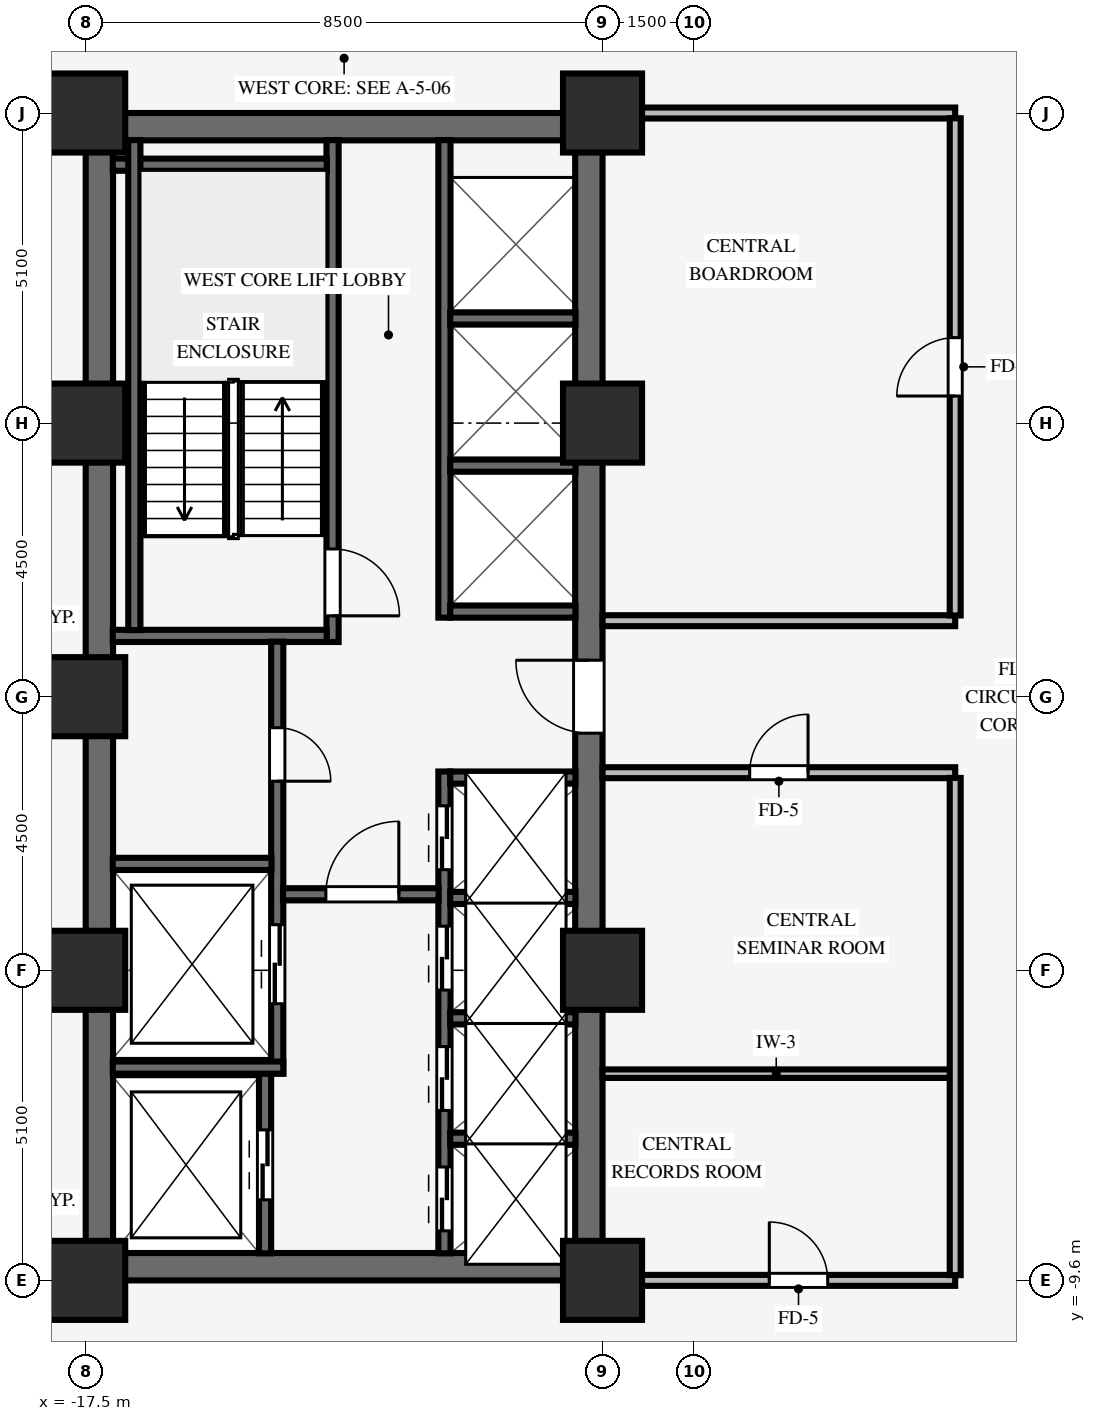
"""IFC4 building model, lengths in metres.
Left out: names, types, materials, properties, quantities, classifications, styles, units other than length and angle.
Written with IfcOpenShell. Run it as: python <this file> out.ifc"""

import sys

from ifc_helpers import new_model, si_unit, direction, frame, frame_2d, origin, origin_2d, place, context, subcontext, project, spatial, rectangle, extrude, source, transform, mapped, element, fill, save


model = new_model("IFC4")
c1 = context("Model", 3, precision=1e-05, world=origin(), true_north=direction((0.0, 1.0)))
c2 = subcontext(c1, "Body", "Model", "MODEL_VIEW")
j1 = project(units=[si_unit("LENGTHUNIT", "METRE"), si_unit("PLANEANGLEUNIT", "RADIAN")], contexts=[c1])
p1 = place(None, origin())
s1 = spatial("IfcSite", under=j1, at=p1, CompositionType="ELEMENT")
p2 = place(p1, origin())
s2 = spatial("IfcBuilding", under=s1, at=p2, CompositionType="ELEMENT")
p3 = place(p2, frame((0.0, 0.0, 27.6)))
s3 = spatial("IfcBuildingStorey", under=s2, at=p3, CompositionType="ELEMENT", Elevation=27.6)
for number, where, z_axis, x_axis in (
    (1, (-17.5, -9.375, 0.0), (0.0, 0.0, 1.0), (1.0, 0.0, 0.0)),
    (2, (-17.5, 9.375, 0.0), (0.0, 0.0, 1.0), (1.0, 0.0, 0.0)),
):
    element("IfcWall", number, at=place(p3, frame(where, z_axis=z_axis, x_axis=x_axis)), inside=s3, PredefinedType="SHEAR", context=c2, shape_type="SweptSolid", body=[
        extrude(rectangle(XDim=8.5, YDim=0.45, at=frame_2d((4.25, 0.0))), origin(), (0.0, 0.0, 1.0), 3.37),
    ])
p4 = place(p3, frame((-17.275, -9.155, 0.0), z_axis=(0.0, 0.0, 1.0), x_axis=(0.0, 1.0, 0.0)))
e3 = element("IfcWall", 3, at=p4, inside=s3, PredefinedType="SHEAR", context=c2, shape_type="SweptSolid", body=[
    extrude(rectangle(XDim=18.31, YDim=0.45, at=frame_2d((9.155, 0.0))), origin(), (0.0, 0.0, 1.0), 3.37),
])
p5 = place(p3, frame((-9.225, -9.155, 0.0), z_axis=(0.0, 0.0, 1.0), x_axis=(0.0, 1.0, 0.0)))
e4 = element("IfcWall", 4, at=p5, inside=s3, PredefinedType="SHEAR", context=c2, shape_type="SweptSolid", body=[
    extrude(rectangle(XDim=18.31, YDim=0.45, at=frame_2d((9.155, 0.0))), origin(), (0.0, 0.0, 1.0), 3.37),
])
p6 = place(p5, frame((8.555, 0.0, 0.0)))
e5 = element("IfcOpeningElement", 5, at=p6, cuts=e4, PredefinedType="OPENING", context=c2, shape_type="SweptSolid", body=[
    extrude(rectangle(XDim=1.2, YDim=2.15, at=frame_2d((0.6, 1.075))), frame((0.0, 0.235, 0.0), z_axis=(0.0, -1.0, 0.0), x_axis=(1.0, 0.0, 0.0)), (0.0, 0.0, 1.0), 0.47),
])
for number, where, z_axis, x_axis in (
    (6, (-17.5, -9.6, 0.0), (0.0, 0.0, 1.0), (1.0, 0.0, 0.0)),
    (7, (-17.5, -4.5, 0.0), (0.0, 0.0, 1.0), (1.0, 0.0, 0.0)),
    (8, (-17.5, 4.5, 0.0), (0.0, 0.0, 1.0), (1.0, 0.0, 0.0)),
    (9, (-17.5, 9.6, 0.0), (0.0, 0.0, 1.0), (1.0, 0.0, 0.0)),
    (10, (-9.0, -9.6, 0.0), (0.0, 0.0, 1.0), (1.0, 0.0, 0.0)),
    (11, (-9.0, -4.5, 0.0), (0.0, 0.0, 1.0), (1.0, 0.0, 0.0)),
    (12, (-9.0, 4.5, 0.0), (0.0, 0.0, 1.0), (1.0, 0.0, 0.0)),
    (13, (-9.0, 9.6, 0.0), (0.0, 0.0, 1.0), (1.0, 0.0, 0.0)),
    (14, (-17.5, 0.0, 0.0), (0.0, 0.0, 1.0), (1.0, 0.0, 0.0)),
):
    element("IfcColumn", number, at=place(p3, frame(where, z_axis=z_axis, x_axis=x_axis)), inside=s3, PredefinedType="COLUMN", context=c2, shape_type="SweptSolid", body=[
        extrude(rectangle(XDim=1.3, YDim=1.3, at=origin_2d()), origin(), (0.0, 0.0, 1.0), 3.37),
    ])
p7 = place(p3, frame((-13.44, 0.9, 0.0), z_axis=(0.0, 0.0, 1.0), x_axis=(0.0, 1.0, 0.0)))
e15 = element("IfcWall", 15, at=p7, inside=s3, PredefinedType="SHEAR", context=c2, shape_type="SweptSolid", body=[
    extrude(rectangle(XDim=8.255, YDim=0.2, at=frame_2d((4.127, 0.0))), origin(), (0.0, 0.0, 1.0), 3.37),
])
p8 = place(p7, frame((1.53, 0.0, 0.0), z_axis=(0.0, 0.0, 1.0), x_axis=(-1.0, 0.0, 0.0)))
e16 = element("IfcOpeningElement", 16, at=p8, cuts=e15, PredefinedType="OPENING", context=c2, shape_type="SweptSolid", body=[
    extrude(rectangle(XDim=1.1, YDim=2.15, at=frame_2d((0.55, 1.075))), frame((0.0, 0.11, 0.0), z_axis=(0.0, -1.0, 0.0), x_axis=(1.0, 0.0, 0.0)), (0.0, 0.0, 1.0), 0.22),
])
for number, where, z_axis, x_axis in (
    (17, (-17.055, 1.0, 0.0), (0.0, 0.0, 1.0), (1.0, 0.0, 0.0)),
    (18, (-17.055, 8.75, 0.0), (0.0, 0.0, 1.0), (1.0, 0.0, 0.0)),
):
    element("IfcWall", number, at=place(p3, frame(where, z_axis=z_axis, x_axis=x_axis)), inside=s3, PredefinedType="SHEAR", context=c2, shape_type="SweptSolid", body=[
        extrude(rectangle(XDim=3.52, YDim=0.2, at=frame_2d((1.76, 0.0))), origin(), (0.0, 0.0, 1.0), 3.37),
    ])
p9 = place(p3, frame((-16.7, 1.095, 0.0), z_axis=(0.0, 0.0, 1.0), x_axis=(0.0, 1.0, 0.0)))
e19 = element("IfcWall", 19, at=p9, inside=s3, PredefinedType="SHEAR", context=c2, shape_type="SweptSolid", body=[
    extrude(rectangle(XDim=8.06, YDim=0.2, at=frame_2d((4.03, 0.0))), origin(), (0.0, 0.0, 1.0), 3.37),
])
p10 = place(p3, frame((-14.55, -9.155, 0.0), z_axis=(0.0, 0.0, 1.0), x_axis=(0.0, 1.0, 0.0)))
e20 = element("IfcWall", 20, at=p10, inside=s3, PredefinedType="SHEAR", context=c2, shape_type="SweptSolid", body=[
    extrude(rectangle(XDim=2.96, YDim=0.2, at=frame_2d((1.48, 0.0))), origin(), (0.0, 0.0, 1.0), 3.37),
])
p11 = place(p10, frame((0.88, 0.0, 0.0)))
e21 = element("IfcOpeningElement", 21, at=p11, cuts=e20, PredefinedType="OPENING", context=c2, shape_type="SweptSolid", body=[
    extrude(rectangle(XDim=1.15, YDim=2.15, at=frame_2d((0.575, 1.075))), frame((0.0, 0.11, 0.0), z_axis=(0.0, -1.0, 0.0), x_axis=(1.0, 0.0, 0.0)), (0.0, 0.0, 1.0), 0.22),
])
p12 = place(p3, frame((-14.35, -6.2, 0.0), z_axis=(0.0, 0.0, 1.0), x_axis=(0.0, 1.0, 0.0)))
e22 = element("IfcWall", 22, at=p12, inside=s3, PredefinedType="SHEAR", context=c2, shape_type="SweptSolid", body=[
    extrude(rectangle(XDim=7.105, YDim=0.2, at=frame_2d((3.552, 0.0))), origin(), (0.0, 0.0, 1.0), 3.37),
])
p13 = place(p12, frame((5.69, 0.0, 0.0), z_axis=(0.0, 0.0, 1.0), x_axis=(-1.0, 0.0, 0.0)))
e23 = element("IfcOpeningElement", 23, at=p13, cuts=e22, PredefinedType="OPENING", context=c2, shape_type="SweptSolid", body=[
    extrude(rectangle(XDim=0.88, YDim=2.1, at=frame_2d((0.44, 1.05))), frame((0.0, 0.11, 0.0), z_axis=(0.0, -1.0, 0.0), x_axis=(1.0, 0.0, 0.0)), (0.0, 0.0, 1.0), 0.22),
])
p14 = place(p12, frame((1.15, 0.0, 0.0)))
e24 = element("IfcOpeningElement", 24, at=p14, cuts=e22, PredefinedType="OPENING", context=c2, shape_type="SweptSolid", body=[
    extrude(rectangle(XDim=1.3, YDim=2.2, at=frame_2d((0.65, 1.1))), frame((0.0, 0.11, 0.0), z_axis=(0.0, -1.0, 0.0), x_axis=(1.0, 0.0, 0.0)), (0.0, 0.0, 1.0), 0.22),
])
p15 = place(p3, frame((-17.055, -6.1, 0.0), z_axis=(0.0, 0.0, 1.0), x_axis=(1.0, 0.0, 0.0)))
e25 = element("IfcWall", 25, at=p15, inside=s3, PredefinedType="SHEAR", context=c2, shape_type="SweptSolid", body=[
    extrude(rectangle(XDim=2.805, YDim=0.2, at=frame_2d((1.402, 0.0))), origin(), (0.0, 0.0, 1.0), 3.37),
])
p16 = place(p3, frame((-17.055, -2.75, 0.0), z_axis=(0.0, 0.0, 1.0), x_axis=(1.0, 0.0, 0.0)))
e26 = element("IfcWall", 26, at=p16, inside=s3, PredefinedType="SHEAR", context=c2, shape_type="SweptSolid", body=[
    extrude(rectangle(XDim=2.61, YDim=0.2, at=frame_2d((1.305, 0.0))), origin(), (0.0, 0.0, 1.0), 3.37),
])
p17 = place(p3, frame((-11.6, -9.155, 0.0), z_axis=(0.0, 0.0, 1.0), x_axis=(0.0, 1.0, 0.0)))
e27 = element("IfcWall", 27, at=p17, inside=s3, PredefinedType="SHEAR", context=c2, shape_type="SweptSolid", body=[
    extrude(rectangle(XDim=7.925, YDim=0.2, at=frame_2d((3.962, 0.0))), origin(), (0.0, 0.0, 1.0), 3.37),
])
p18 = place(p17, frame((0.37, 0.0, 0.0)))
e28 = element("IfcOpeningElement", 28, at=p18, cuts=e27, PredefinedType="OPENING", context=c2, shape_type="SweptSolid", body=[
    extrude(rectangle(XDim=1.05, YDim=2.15, at=frame_2d((0.525, 1.075))), frame((0.0, 0.11, 0.0), z_axis=(0.0, -1.0, 0.0), x_axis=(1.0, 0.0, 0.0)), (0.0, 0.0, 1.0), 0.22),
])
p19 = place(p17, frame((2.35, 0.0, 0.0)))
e29 = element("IfcOpeningElement", 29, at=p19, cuts=e27, PredefinedType="OPENING", context=c2, shape_type="SweptSolid", body=[
    extrude(rectangle(XDim=1.05, YDim=2.15, at=frame_2d((0.525, 1.075))), frame((0.0, 0.11, 0.0), z_axis=(0.0, -1.0, 0.0), x_axis=(1.0, 0.0, 0.0)), (0.0, 0.0, 1.0), 0.22),
])
p20 = place(p17, frame((4.33, 0.0, 0.0)))
e30 = element("IfcOpeningElement", 30, at=p20, cuts=e27, PredefinedType="OPENING", context=c2, shape_type="SweptSolid", body=[
    extrude(rectangle(XDim=1.05, YDim=2.15, at=frame_2d((0.525, 1.075))), frame((0.0, 0.11, 0.0), z_axis=(0.0, -1.0, 0.0), x_axis=(1.0, 0.0, 0.0)), (0.0, 0.0, 1.0), 0.22),
])
p21 = place(p17, frame((6.31, 0.0, 0.0)))
e31 = element("IfcOpeningElement", 31, at=p21, cuts=e27, PredefinedType="OPENING", context=c2, shape_type="SweptSolid", body=[
    extrude(rectangle(XDim=1.05, YDim=2.15, at=frame_2d((0.525, 1.075))), frame((0.0, 0.11, 0.0), z_axis=(0.0, -1.0, 0.0), x_axis=(1.0, 0.0, 0.0)), (0.0, 0.0, 1.0), 0.22),
])
p22 = place(p3, frame((-14.255, -3.25, 0.0), z_axis=(0.0, 0.0, 1.0), x_axis=(1.0, 0.0, 0.0)))
e32 = element("IfcWall", 32, at=p22, inside=s3, PredefinedType="SHEAR", context=c2, shape_type="SweptSolid", body=[
    extrude(rectangle(XDim=2.56, YDim=0.2, at=frame_2d((1.28, 0.0))), origin(), (0.0, 0.0, 1.0), 3.37),
])
p23 = place(p22, frame((0.705, 0.0, 0.0)))
e33 = element("IfcOpeningElement", 33, at=p23, cuts=e32, PredefinedType="OPENING", context=c2, shape_type="SweptSolid", body=[
    extrude(rectangle(XDim=1.2, YDim=2.15, at=frame_2d((0.6, 1.075))), frame((0.0, 0.11, 0.0), z_axis=(0.0, -1.0, 0.0), x_axis=(1.0, 0.0, 0.0)), (0.0, 0.0, 1.0), 0.22),
])
for number, where, z_axis, x_axis in (
    (34, (-11.505, -7.27, 0.0), (0.0, 0.0, 1.0), (1.0, 0.0, 0.0)),
    (35, (-11.505, -5.29, 0.0), (0.0, 0.0, 1.0), (1.0, 0.0, 0.0)),
    (36, (-11.505, -3.31, 0.0), (0.0, 0.0, 1.0), (1.0, 0.0, 0.0)),
    (37, (-11.505, -1.33, 0.0), (0.0, 0.0, 1.0), (1.0, 0.0, 0.0)),
):
    element("IfcWall", number, at=place(p3, frame(where, z_axis=z_axis, x_axis=x_axis)), inside=s3, PredefinedType="SHEAR", context=c2, shape_type="SweptSolid", body=[
        extrude(rectangle(XDim=2.06, YDim=0.2, at=frame_2d((1.03, 0.0))), origin(), (0.0, 0.0, 1.0), 3.37),
    ])
p24 = place(p3, frame((-11.6, 1.3, 0.0), z_axis=(0.0, 0.0, 1.0), x_axis=(0.0, 1.0, 0.0)))
e38 = element("IfcWall", 38, at=p24, inside=s3, PredefinedType="SHEAR", context=c2, shape_type="SweptSolid", body=[
    extrude(rectangle(XDim=7.855, YDim=0.2, at=frame_2d((3.927, 0.0))), origin(), (0.0, 0.0, 1.0), 3.37),
])
for number, where, z_axis, x_axis in (
    (39, (-11.505, 1.4, 0.0), (0.0, 0.0, 1.0), (1.0, 0.0, 0.0)),
    (40, (-11.505, 3.8, 0.0), (0.0, 0.0, 1.0), (1.0, 0.0, 0.0)),
    (41, (-11.505, 6.22, 0.0), (0.0, 0.0, 1.0), (1.0, 0.0, 0.0)),
):
    element("IfcWall", number, at=place(p3, frame(where, z_axis=z_axis, x_axis=x_axis)), inside=s3, PredefinedType="SHEAR", context=c2, shape_type="SweptSolid", body=[
        extrude(rectangle(XDim=2.06, YDim=0.2, at=frame_2d((1.03, 0.0))), origin(), (0.0, 0.0, 1.0), 3.37),
    ])
p25 = place(p3, frame((-8.354, -9.6, 0.0), z_axis=(0.0, 0.0, 1.0), x_axis=(1.0, 0.0, 0.0)))
e42 = element("IfcWall", 42, at=p25, inside=s3, PredefinedType="PARTITIONING", context=c2, shape_type="SweptSolid", body=[
    extrude(rectangle(XDim=5.154, YDim=0.18, at=frame_2d((2.577, 0.0))), origin(), (0.0, 0.0, 1.0), 2.405),
])
p26 = place(p25, frame((2.097, 0.0, 0.0)))
e43 = element("IfcOpeningElement", 43, at=p26, cuts=e42, PredefinedType="OPENING", context=c2, shape_type="SweptSolid", body=[
    extrude(rectangle(XDim=0.96, YDim=2.1, at=frame_2d((0.48, 1.05))), frame((0.0, 0.1, 0.0), z_axis=(0.0, -1.0, 0.0), x_axis=(1.0, 0.0, 0.0)), (0.0, 0.0, 1.0), 0.2),
])
p27 = place(p3, frame((-9.0, -6.2, 0.0), z_axis=(0.0, 0.0, 1.0), x_axis=(1.0, 0.0, 0.0)))
e44 = element("IfcWall", 44, at=p27, inside=s3, PredefinedType="PARTITIONING", context=c2, shape_type="SweptSolid", body=[
    extrude(rectangle(XDim=5.714, YDim=0.14, at=frame_2d((2.857, 0.0))), origin(), (0.0, 0.0, 1.0), 3.36),
])
p28 = place(p3, frame((-9.0, -1.25, 0.0), z_axis=(0.0, 0.0, 1.0), x_axis=(1.0, 0.0, 0.0)))
e45 = element("IfcWall", 45, at=p28, inside=s3, PredefinedType="PARTITIONING", context=c2, shape_type="SweptSolid", body=[
    extrude(rectangle(XDim=5.8, YDim=0.18, at=frame_2d((2.9, 0.0))), origin(), (0.0, 0.0, 1.0), 3.36),
])
p29 = place(p28, frame((2.42, 0.0, 0.0)))
e46 = element("IfcOpeningElement", 46, at=p29, cuts=e45, PredefinedType="OPENING", context=c2, shape_type="SweptSolid", body=[
    extrude(rectangle(XDim=0.96, YDim=2.1, at=frame_2d((0.48, 1.05))), frame((0.0, 0.1, 0.0), z_axis=(0.0, -1.0, 0.0), x_axis=(1.0, 0.0, 0.0)), (0.0, 0.0, 1.0), 0.2),
])
p30 = place(p3, frame((-9.0, 1.25, 0.0), z_axis=(0.0, 0.0, 1.0), x_axis=(1.0, 0.0, 0.0)))
e47 = element("IfcWall", 47, at=p30, inside=s3, PredefinedType="PARTITIONING", context=c2, shape_type="SweptSolid", body=[
    extrude(rectangle(XDim=5.8, YDim=0.18, at=frame_2d((2.9, 0.0))), origin(), (0.0, 0.0, 1.0), 3.36),
])
p31 = place(p3, frame((-8.354, 9.6, 0.0), z_axis=(0.0, 0.0, 1.0), x_axis=(1.0, 0.0, 0.0)))
e48 = element("IfcWall", 48, at=p31, inside=s3, PredefinedType="PARTITIONING", context=c2, shape_type="SweptSolid", body=[
    extrude(rectangle(XDim=5.154, YDim=0.18, at=frame_2d((2.577, 0.0))), origin(), (0.0, 0.0, 1.0), 2.405),
])
p32 = place(p3, frame((-3.2, -9.514, 0.0), z_axis=(0.0, 0.0, 1.0), x_axis=(0.0, 1.0, 0.0)))
e49 = element("IfcWall", 49, at=p32, inside=s3, PredefinedType="PARTITIONING", context=c2, shape_type="SweptSolid", body=[
    extrude(rectangle(XDim=8.178, YDim=0.18, at=frame_2d((4.089, 0.0))), origin(), (0.0, 0.0, 1.0), 3.36),
])
p33 = place(p3, frame((-3.2, 1.336, 0.0), z_axis=(0.0, 0.0, 1.0), x_axis=(0.0, 1.0, 0.0)))
e50 = element("IfcWall", 50, at=p33, inside=s3, PredefinedType="PARTITIONING", context=c2, shape_type="SweptSolid", body=[
    extrude(rectangle(XDim=8.178, YDim=0.18, at=frame_2d((4.089, 0.0))), origin(), (0.0, 0.0, 1.0), 3.36),
])
p34 = place(p33, frame((3.609, 0.0, 0.0)))
e51 = element("IfcOpeningElement", 51, at=p34, cuts=e50, PredefinedType="OPENING", context=c2, shape_type="SweptSolid", body=[
    extrude(rectangle(XDim=0.96, YDim=2.1, at=frame_2d((0.48, 1.05))), frame((0.0, 0.1, 0.0), z_axis=(0.0, -1.0, 0.0), x_axis=(1.0, 0.0, 0.0)), (0.0, 0.0, 1.0), 0.2),
])
m1 = source(origin(), c2, "Body", "SweptSolid", [
    extrude(rectangle(XDim=1.1, YDim=2.15, at=frame_2d((0.55, 1.075))), frame((0.0, 0.025, 0.0), z_axis=(0.0, -1.0, 0.0), x_axis=(1.0, 0.0, 0.0)), (0.0, 0.0, 1.0), 0.05),
])
p35 = place(p8, origin())
e52 = element("IfcDoor", 52, at=p35, inside=s3, OperationType="SINGLE_SWING_RIGHT", PredefinedType="DOOR", context=c2, shape_type="MappedRepresentation", body=[
    mapped(m1, transform((0.0, 0.0, 0.0), scale=1.0)),
])
fill(e16, e52)
m2 = source(origin(), c2, "Body", "SweptSolid", [
    extrude(rectangle(XDim=0.88, YDim=2.1, at=frame_2d((0.44, 1.05))), frame((0.0, 0.025, 0.0), z_axis=(0.0, -1.0, 0.0), x_axis=(1.0, 0.0, 0.0)), (0.0, 0.0, 1.0), 0.05),
])
p36 = place(p13, origin())
e53 = element("IfcDoor", 53, at=p36, inside=s3, OperationType="SINGLE_SWING_RIGHT", PredefinedType="DOOR", context=c2, shape_type="MappedRepresentation", body=[
    mapped(m2, transform((0.0, 0.0, 0.0), scale=1.0)),
])
fill(e23, e53)
m3 = source(origin(), c2, "Body", "SweptSolid", [
    extrude(rectangle(XDim=1.2, YDim=2.15, at=frame_2d((0.6, 1.075))), frame((0.0, 0.025, 0.0), z_axis=(0.0, -1.0, 0.0), x_axis=(1.0, 0.0, 0.0)), (0.0, 0.0, 1.0), 0.05),
])
p37 = place(p23, origin())
e54 = element("IfcDoor", 54, at=p37, inside=s3, OperationType="SINGLE_SWING_RIGHT", PredefinedType="DOOR", context=c2, shape_type="MappedRepresentation", body=[
    mapped(m3, transform((0.0, 0.0, 0.0), scale=1.0)),
])
fill(e33, e54)
p38 = place(p6, origin())
e55 = element("IfcDoor", 55, at=p38, inside=s3, OperationType="SINGLE_SWING_RIGHT", PredefinedType="DOOR", context=c2, shape_type="MappedRepresentation", body=[
    mapped(m3, transform((0.0, 0.0, 0.0), scale=1.0)),
])
fill(e5, e55)
m4 = source(origin(), c2, "Body", "SweptSolid", [
    extrude(rectangle(XDim=1.15, YDim=2.15, at=frame_2d((0.575, 1.075))), frame((0.0, 0.025, 0.0), z_axis=(0.0, -1.0, 0.0), x_axis=(1.0, 0.0, 0.0)), (0.0, 0.0, 1.0), 0.05),
])
p39 = place(p11, origin())
e56 = element("IfcDoor", 56, at=p39, inside=s3, OperationType="DOUBLE_DOOR_SLIDING", PredefinedType="DOOR", context=c2, shape_type="MappedRepresentation", body=[
    mapped(m4, transform((0.0, 0.0, 0.0), scale=1.0)),
])
fill(e21, e56)
m5 = source(origin(), c2, "Body", "SweptSolid", [
    extrude(rectangle(XDim=1.3, YDim=2.2, at=frame_2d((0.65, 1.1))), frame((0.0, 0.025, 0.0), z_axis=(0.0, -1.0, 0.0), x_axis=(1.0, 0.0, 0.0)), (0.0, 0.0, 1.0), 0.05),
])
p40 = place(p14, origin())
e57 = element("IfcDoor", 57, at=p40, inside=s3, OperationType="DOUBLE_DOOR_SLIDING", PredefinedType="DOOR", context=c2, shape_type="MappedRepresentation", body=[
    mapped(m5, transform((0.0, 0.0, 0.0), scale=1.0)),
])
fill(e24, e57)
m6 = source(origin(), c2, "Body", "SweptSolid", [
    extrude(rectangle(XDim=1.05, YDim=2.15, at=frame_2d((0.525, 1.075))), frame((0.0, 0.025, 0.0), z_axis=(0.0, -1.0, 0.0), x_axis=(1.0, 0.0, 0.0)), (0.0, 0.0, 1.0), 0.05),
])
p41 = place(p18, origin())
e58 = element("IfcDoor", 58, at=p41, inside=s3, OperationType="DOUBLE_DOOR_SLIDING", PredefinedType="DOOR", context=c2, shape_type="MappedRepresentation", body=[
    mapped(m6, transform((0.0, 0.0, 0.0), scale=1.0)),
])
fill(e28, e58)
p42 = place(p19, origin())
e59 = element("IfcDoor", 59, at=p42, inside=s3, OperationType="DOUBLE_DOOR_SLIDING", PredefinedType="DOOR", context=c2, shape_type="MappedRepresentation", body=[
    mapped(m6, transform((0.0, 0.0, 0.0), scale=1.0)),
])
fill(e29, e59)
p43 = place(p20, origin())
e60 = element("IfcDoor", 60, at=p43, inside=s3, OperationType="DOUBLE_DOOR_SLIDING", PredefinedType="DOOR", context=c2, shape_type="MappedRepresentation", body=[
    mapped(m6, transform((0.0, 0.0, 0.0), scale=1.0)),
])
fill(e30, e60)
p44 = place(p21, origin())
e61 = element("IfcDoor", 61, at=p44, inside=s3, OperationType="DOUBLE_DOOR_SLIDING", PredefinedType="DOOR", context=c2, shape_type="MappedRepresentation", body=[
    mapped(m6, transform((0.0, 0.0, 0.0), scale=1.0)),
])
fill(e31, e61)
m7 = source(origin(), c2, "Body", "SweptSolid", [
    extrude(rectangle(XDim=0.96, YDim=2.1, at=frame_2d((0.48, 1.05))), frame((0.0, 0.025, 0.0), z_axis=(0.0, -1.0, 0.0), x_axis=(1.0, 0.0, 0.0)), (0.0, 0.0, 1.0), 0.05),
])
p45 = place(p34, origin())
e62 = element("IfcDoor", 62, at=p45, inside=s3, OperationType="SINGLE_SWING_LEFT", PredefinedType="DOOR", context=c2, shape_type="MappedRepresentation", body=[
    mapped(m7, transform((0.0, 0.0, 0.0), scale=1.0)),
])
fill(e51, e62)
p46 = place(p29, origin())
e63 = element("IfcDoor", 63, at=p46, inside=s3, OperationType="SINGLE_SWING_RIGHT", PredefinedType="DOOR", context=c2, shape_type="MappedRepresentation", body=[
    mapped(m7, transform((0.0, 0.0, 0.0), scale=1.0)),
])
fill(e46, e63)
p47 = place(p26, origin())
e64 = element("IfcDoor", 64, at=p47, inside=s3, OperationType="SINGLE_SWING_LEFT", PredefinedType="DOOR", context=c2, shape_type="MappedRepresentation", body=[
    mapped(m7, transform((0.0, 0.0, 0.0), scale=1.0)),
])
fill(e43, e64)
save(model, sys.argv[1])
